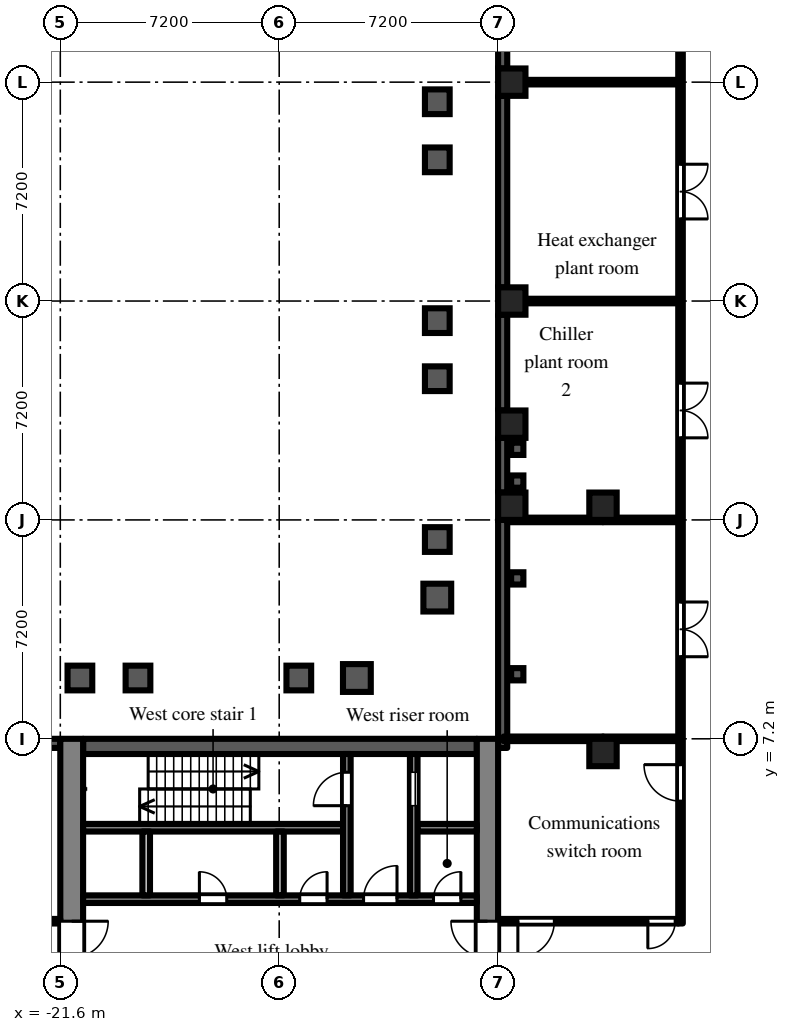
"""IFC4 building model, lengths in metres.
Left out: names, types, materials, properties, quantities, classifications, styles, units other than length and angle.
Written with IfcOpenShell. Run it as: python <this file> out.ifc"""

import sys

from ifc_helpers import new_model, si_unit, direction, frame, frame_2d, origin, origin_2d, place, context, subcontext, project, spatial, polyline, rectangle, outline, extrude, element, fill, save


model = new_model("IFC4")
c1 = context("Model", 3, precision=1e-05, world=origin(), true_north=direction((0.0, 1.0)))
c2 = subcontext(c1, "Body", "Model", "MODEL_VIEW")
j1 = project(units=[si_unit("LENGTHUNIT", "METRE"), si_unit("PLANEANGLEUNIT", "RADIAN")], contexts=[c1])
p1 = place(None, origin())
s1 = spatial("IfcSite", under=j1, at=p1, CompositionType="ELEMENT")
p2 = place(p1, origin())
s2 = spatial("IfcBuilding", under=s1, at=p2, CompositionType="ELEMENT")
p3 = place(p2, frame((0.0, 0.0, 62.7)))
s3 = spatial("IfcBuildingStorey", under=s2, at=p3, CompositionType="ELEMENT", Elevation=62.7)
for number, where, z_axis, x_axis in (
    (1, (-6.75, 14.85, 0.0), (0.0, 0.0, 1.0), (1.0, 0.0, 0.0)),
    (2, (-6.75, 17.55, 0.0), (0.0, 0.0, 1.0), (1.0, 0.0, 0.0)),
    (3, (-6.75, 21.6, 0.0), (0.0, 0.0, 1.0), (1.0, 0.0, 0.0)),
    (4, (-6.75, 28.8, 0.0), (0.0, 0.0, 1.0), (1.0, 0.0, 0.0)),
    (5, (-3.75, 6.75, 0.0), (0.0, 0.0, 1.0), (1.0, 0.0, 0.0)),
    (6, (-3.75, 14.85, 0.0), (0.0, 0.0, 1.0), (1.0, 0.0, 0.0)),
):
    element("IfcColumn", number, at=place(p3, frame(where, z_axis=z_axis, x_axis=x_axis)), inside=s3, PredefinedType="COLUMN", context=c2, shape_type="SweptSolid", body=[
        extrude(rectangle(XDim=0.9, YDim=0.9, at=origin_2d()), origin(), (0.0, 0.0, 1.0), 4.2),
    ])
p4 = place(p3, frame((-7.05, 35.55, 0.0), z_axis=(0.0, 0.0, 1.0), x_axis=(0.0, -1.0, 0.0)))
e7 = element("IfcWall", 7, at=p4, inside=s3, PredefinedType="SOLIDWALL", context=c2, shape_type="SweptSolid", body=[
    extrude(rectangle(XDim=6.3, YDim=0.3, at=frame_2d((3.15, 0.0))), origin(), (0.0, 0.0, 1.0), 3.775),
])
p5 = place(p3, frame((-7.05, 28.35, 0.0), z_axis=(0.0, 0.0, 1.0), x_axis=(0.0, -1.0, 0.0)))
e8 = element("IfcWall", 8, at=p5, inside=s3, PredefinedType="SOLIDWALL", context=c2, shape_type="SweptSolid", body=[
    extrude(outline(polyline([(0.0, 0.0), (6.3, 0.0), (6.3, 3.775), (5.152, 3.775), (5.15, 3.4), (4.35, 3.4), (4.348, 3.775), (0.0, 3.775), (0.0, 0.0)])), frame((0.0, 0.15, 0.0), z_axis=(0.0, -1.0, 0.0), x_axis=(1.0, 0.0, 0.0)), (0.0, 0.0, 1.0), 0.3),
])
p6 = place(p3, frame((-7.05, 21.15, 0.0), z_axis=(0.0, 0.0, 1.0), x_axis=(0.0, -1.0, 0.0)))
e9 = element("IfcWall", 9, at=p6, inside=s3, PredefinedType="SOLIDWALL", context=c2, shape_type="SweptSolid", body=[
    extrude(rectangle(XDim=3.15, YDim=0.3, at=frame_2d((1.575, 0.0))), origin(), (0.0, 0.0, 1.0), 3.775),
])
p7 = place(p3, frame((-7.05, 17.1, 0.0), z_axis=(0.0, 0.0, 1.0), x_axis=(0.0, -1.0, 0.0)))
e10 = element("IfcWall", 10, at=p7, inside=s3, PredefinedType="SOLIDWALL", context=c2, shape_type="SweptSolid", body=[
    extrude(rectangle(XDim=1.8, YDim=0.3, at=frame_2d((0.9, 0.0))), origin(), (0.0, 0.0, 1.0), 3.3),
])
p8 = place(p3, frame((-7.05, 14.4, 0.0), z_axis=(0.0, 0.0, 1.0), x_axis=(0.0, -1.0, 0.0)))
e11 = element("IfcWall", 11, at=p8, inside=s3, PredefinedType="SOLIDWALL", context=c2, shape_type="SweptSolid", body=[
    extrude(rectangle(XDim=7.5, YDim=0.3, at=frame_2d((3.75, 0.0))), origin(), (0.0, 0.0, 1.0), 3.775),
])
p9 = place(p3, frame((-21.6, 7.05, 0.0), z_axis=(0.0, 0.0, 1.0), x_axis=(-1.0, 0.0, 0.0)))
e12 = element("IfcWall", 12, at=p9, inside=s3, PredefinedType="SOLIDWALL", context=c2, shape_type="SweptSolid", body=[
    extrude(rectangle(XDim=2.7, YDim=0.3, at=frame_2d((1.35, 0.0))), origin(), (0.0, 0.0, 1.0), 3.3),
])
p10 = place(p3, frame((-7.55, -7.2, 0.0), z_axis=(0.0, 0.0, 1.0), x_axis=(0.0, 1.0, 0.0)))
e13 = element("IfcWall", 13, at=p10, inside=s3, PredefinedType="SHEAR", context=c2, shape_type="SweptSolid", body=[
    extrude(rectangle(XDim=14.4, YDim=0.7, at=frame_2d((7.2, 0.0))), origin(), (0.0, 0.0, 1.0), 3.775),
])
p11 = place(p10, frame((6.0, 0.0, 0.0)))
e14 = element("IfcOpeningElement", 14, at=p11, cuts=e13, PredefinedType="OPENING", context=c2, shape_type="SweptSolid", body=[
    extrude(rectangle(XDim=2.4, YDim=2.2, at=frame_2d((1.2, 1.1))), frame((0.0, 0.36, 0.0), z_axis=(0.0, -1.0, 0.0), x_axis=(1.0, 0.0, 0.0)), (0.0, 0.0, 1.0), 0.72),
])
p12 = place(p3, frame((-21.225, -7.2, 0.0), z_axis=(0.0, 0.0, 1.0), x_axis=(0.0, 1.0, 0.0)))
e15 = element("IfcWall", 15, at=p12, inside=s3, PredefinedType="SHEAR", context=c2, shape_type="SweptSolid", body=[
    extrude(rectangle(XDim=14.4, YDim=0.75, at=frame_2d((7.2, 0.0))), origin(), (0.0, 0.0, 1.0), 3.775),
])
p13 = place(p12, frame((6.0, 0.0, 0.0)))
e16 = element("IfcOpeningElement", 16, at=p13, cuts=e15, PredefinedType="OPENING", context=c2, shape_type="SweptSolid", body=[
    extrude(rectangle(XDim=2.4, YDim=2.2, at=frame_2d((1.2, 1.1))), frame((0.0, 0.385, 0.0), z_axis=(0.0, -1.0, 0.0), x_axis=(1.0, 0.0, 0.0)), (0.0, 0.0, 1.0), 0.77),
])
p14 = place(p3, frame((-7.9, 6.95, 0.0), z_axis=(0.0, 0.0, 1.0), x_axis=(-1.0, 0.0, 0.0)))
e17 = element("IfcWall", 17, at=p14, inside=s3, PredefinedType="SHEAR", context=c2, shape_type="SweptSolid", body=[
    extrude(rectangle(XDim=12.95, YDim=0.5, at=frame_2d((6.475, 0.0))), origin(), (0.0, 0.0, 1.0), 3.775),
])
p15 = place(p3, frame((-7.9, 1.925, 0.0), z_axis=(0.0, 0.0, 1.0), x_axis=(-1.0, 0.0, 0.0)))
e18 = element("IfcWall", 18, at=p15, inside=s3, PredefinedType="SHEAR", context=c2, shape_type="SweptSolid", body=[
    extrude(rectangle(XDim=12.95, YDim=0.25, at=frame_2d((6.475, 0.0))), origin(), (0.0, 0.0, 1.0), 3.775),
])
p16 = place(p15, frame((0.525, 0.0, 0.0)))
e19 = element("IfcOpeningElement", 19, at=p16, cuts=e18, PredefinedType="OPENING", context=c2, shape_type="SweptSolid", body=[
    extrude(rectangle(XDim=0.9, YDim=2.1, at=frame_2d((0.45, 1.05))), frame((0.0, 0.135, 0.0), z_axis=(0.0, -1.0, 0.0), x_axis=(1.0, 0.0, 0.0)), (0.0, 0.0, 1.0), 0.27),
])
p17 = place(p15, frame((2.625, 0.0, 0.0)))
e20 = element("IfcOpeningElement", 20, at=p17, cuts=e18, PredefinedType="OPENING", context=c2, shape_type="SweptSolid", body=[
    extrude(rectangle(XDim=1.1, YDim=2.1, at=frame_2d((0.55, 1.05))), frame((0.0, 0.135, 0.0), z_axis=(0.0, -1.0, 0.0), x_axis=(1.0, 0.0, 0.0)), (0.0, 0.0, 1.0), 0.27),
])
p18 = place(p15, frame((4.925, 0.0, 0.0)))
e21 = element("IfcOpeningElement", 21, at=p18, cuts=e18, PredefinedType="OPENING", context=c2, shape_type="SweptSolid", body=[
    extrude(rectangle(XDim=0.9, YDim=2.1, at=frame_2d((0.45, 1.05))), frame((0.0, 0.135, 0.0), z_axis=(0.0, -1.0, 0.0), x_axis=(1.0, 0.0, 0.0)), (0.0, 0.0, 1.0), 0.27),
])
p19 = place(p15, frame((8.225, 0.0, 0.0)))
e22 = element("IfcOpeningElement", 22, at=p19, cuts=e18, PredefinedType="OPENING", context=c2, shape_type="SweptSolid", body=[
    extrude(rectangle(XDim=0.9, YDim=2.1, at=frame_2d((0.45, 1.05))), frame((0.0, 0.135, 0.0), z_axis=(0.0, -1.0, 0.0), x_axis=(1.0, 0.0, 0.0)), (0.0, 0.0, 1.0), 0.27),
])
p20 = place(p3, frame((-7.9, 4.275, 0.0), z_axis=(0.0, 0.0, 1.0), x_axis=(-1.0, 0.0, 0.0)))
e23 = element("IfcWall", 23, at=p20, inside=s3, PredefinedType="SHEAR", context=c2, shape_type="SweptSolid", body=[
    extrude(rectangle(XDim=1.95, YDim=0.25, at=frame_2d((0.975, 0.0))), origin(), (0.0, 0.0, 1.0), 3.775),
])
p21 = place(p3, frame((-12.3, 4.275, 0.0), z_axis=(0.0, 0.0, 1.0), x_axis=(-1.0, 0.0, 0.0)))
e24 = element("IfcWall", 24, at=p21, inside=s3, PredefinedType="SHEAR", context=c2, shape_type="SweptSolid", body=[
    extrude(rectangle(XDim=8.55, YDim=0.25, at=frame_2d((4.275, 0.0))), origin(), (0.0, 0.0, 1.0), 3.775),
])
p22 = place(p3, frame((-9.975, 2.05, 0.0), z_axis=(0.0, 0.0, 1.0), x_axis=(0.0, 1.0, 0.0)))
e25 = element("IfcWall", 25, at=p22, inside=s3, PredefinedType="SHEAR", context=c2, shape_type="SweptSolid", body=[
    extrude(rectangle(XDim=4.65, YDim=0.25, at=frame_2d((2.325, 0.0))), origin(), (0.0, 0.0, 1.0), 3.775),
])
p23 = place(p22, frame((2.95, 0.0, 0.0)))
e26 = element("IfcOpeningElement", 26, at=p23, cuts=e25, PredefinedType="OPENING", context=c2, shape_type="SweptSolid", body=[
    extrude(rectangle(XDim=1.1, YDim=2.1, at=frame_2d((0.55, 1.05))), frame((0.0, 0.135, 0.0), z_axis=(0.0, -1.0, 0.0), x_axis=(1.0, 0.0, 0.0)), (0.0, 0.0, 1.0), 0.27),
])
p24 = place(p3, frame((-12.175, 2.05, 0.0), z_axis=(0.0, 0.0, 1.0), x_axis=(0.0, 1.0, 0.0)))
e27 = element("IfcWall", 27, at=p24, inside=s3, PredefinedType="SHEAR", context=c2, shape_type="SweptSolid", body=[
    extrude(rectangle(XDim=4.65, YDim=0.25, at=frame_2d((2.325, 0.0))), origin(), (0.0, 0.0, 1.0), 3.775),
])
p25 = place(p24, frame((2.95, 0.0, 0.0)))
e28 = element("IfcOpeningElement", 28, at=p25, cuts=e27, PredefinedType="OPENING", context=c2, shape_type="SweptSolid", body=[
    extrude(rectangle(XDim=1.1, YDim=2.1, at=frame_2d((0.55, 1.05))), frame((0.0, 0.135, 0.0), z_axis=(0.0, -1.0, 0.0), x_axis=(1.0, 0.0, 0.0)), (0.0, 0.0, 1.0), 0.27),
])
for number, where, z_axis, x_axis in (
    (29, (-14.375, 2.05, 0.0), (0.0, 0.0, 1.0), (0.0, 1.0, 0.0)),
    (30, (-18.775, 2.05, 0.0), (0.0, 0.0, 1.0), (0.0, 1.0, 0.0)),
):
    element("IfcWall", number, at=place(p3, frame(where, z_axis=z_axis, x_axis=x_axis)), inside=s3, PredefinedType="PARTITIONING", context=c2, shape_type="SweptSolid", body=[
        extrude(rectangle(XDim=2.1, YDim=0.25, at=frame_2d((1.05, 0.0))), origin(), (0.0, 0.0, 1.0), 3.775),
    ])
p26 = place(p3, frame((-36.5, 1.2, 0.0), z_axis=(0.0, 0.0, 1.0), x_axis=(1.0, 0.0, 0.0)))
e31 = element("IfcWall", 31, at=p26, inside=s3, PredefinedType="PARTITIONING", context=c2, shape_type="SweptSolid", body=[
    extrude(rectangle(XDim=14.9, YDim=0.15, at=frame_2d((7.45, 0.0))), origin(), (0.0, 0.0, 1.0), 3.775),
])
p27 = place(p26, frame((4.75, 0.0, 0.0)))
e32 = element("IfcOpeningElement", 32, at=p27, cuts=e31, PredefinedType="OPENING", context=c2, shape_type="SweptSolid", body=[
    extrude(rectangle(XDim=0.9, YDim=2.1, at=frame_2d((0.45, 1.05))), frame((0.0, 0.085, 0.0), z_axis=(0.0, -1.0, 0.0), x_axis=(1.0, 0.0, 0.0)), (0.0, 0.0, 1.0), 0.17),
])
p28 = place(p26, frame((12.5, 0.0, 0.0)))
e33 = element("IfcOpeningElement", 33, at=p28, cuts=e31, PredefinedType="OPENING", context=c2, shape_type="SweptSolid", body=[
    extrude(rectangle(XDim=1.2, YDim=2.1, at=frame_2d((0.6, 1.05))), frame((0.0, 0.085, 0.0), z_axis=(0.0, -1.0, 0.0), x_axis=(1.0, 0.0, 0.0)), (0.0, 0.0, 1.0), 0.17),
])
p29 = place(p26, frame((1.15, 0.0, 0.0)))
e34 = element("IfcOpeningElement", 34, at=p29, cuts=e31, PredefinedType="OPENING", context=c2, shape_type="SweptSolid", body=[
    extrude(rectangle(XDim=1.8, YDim=2.1, at=frame_2d((0.9, 1.05))), frame((0.0, 0.085, 0.0), z_axis=(0.0, -1.0, 0.0), x_axis=(1.0, 0.0, 0.0)), (0.0, 0.0, 1.0), 0.17),
])
p30 = place(p3, frame((-7.2, 1.2, 0.0), z_axis=(0.0, 0.0, 1.0), x_axis=(1.0, 0.0, 0.0)))
e35 = element("IfcWall", 35, at=p30, inside=s3, PredefinedType="PARTITIONING", context=c2, shape_type="SweptSolid", body=[
    extrude(rectangle(XDim=5.925, YDim=0.15, at=frame_2d((2.962, 0.0))), origin(), (0.0, 0.0, 1.0), 3.775),
])
p31 = place(p30, frame((0.65, 0.0, 0.0)))
e36 = element("IfcOpeningElement", 36, at=p31, cuts=e35, PredefinedType="OPENING", context=c2, shape_type="SweptSolid", body=[
    extrude(rectangle(XDim=1.2, YDim=2.1, at=frame_2d((0.6, 1.05))), frame((0.0, 0.085, 0.0), z_axis=(0.0, -1.0, 0.0), x_axis=(1.0, 0.0, 0.0)), (0.0, 0.0, 1.0), 0.17),
])
p32 = place(p30, frame((4.925, 0.0, 0.0)))
e37 = element("IfcOpeningElement", 37, at=p32, cuts=e35, PredefinedType="OPENING", context=c2, shape_type="SweptSolid", body=[
    extrude(rectangle(XDim=0.9, YDim=2.1, at=frame_2d((0.45, 1.05))), frame((0.0, 0.085, 0.0), z_axis=(0.0, -1.0, 0.0), x_axis=(1.0, 0.0, 0.0)), (0.0, 0.0, 1.0), 0.17),
])
p33 = place(p3, frame((-7.02, 7.2, 0.0), z_axis=(0.0, 0.0, 1.0), x_axis=(1.0, 0.0, 0.0)))
e38 = element("IfcWall", 38, at=p33, inside=s3, PredefinedType="PARTITIONING", context=c2, shape_type="SweptSolid", body=[
    extrude(rectangle(XDim=3.27, YDim=0.15, at=frame_2d((1.635, 0.0))), origin(), (0.0, 0.0, 1.0), 3.3),
])
p34 = place(p3, frame((-6.9, 14.4, 0.0), z_axis=(0.0, 0.0, 1.0), x_axis=(1.0, 0.0, 0.0)))
e39 = element("IfcWall", 39, at=p34, inside=s3, PredefinedType="PARTITIONING", context=c2, shape_type="SweptSolid", body=[
    extrude(rectangle(XDim=3.15, YDim=0.15, at=frame_2d((1.575, 0.0))), origin(), (0.0, 0.0, 1.0), 3.3),
])
p35 = place(p3, frame((-6.9, 21.6, 0.0), z_axis=(0.0, 0.0, 1.0), x_axis=(1.0, 0.0, 0.0)))
e40 = element("IfcWall", 40, at=p35, inside=s3, PredefinedType="PARTITIONING", context=c2, shape_type="SweptSolid", body=[
    extrude(rectangle(XDim=5.625, YDim=0.15, at=frame_2d((2.812, 0.0))), origin(), (0.0, 0.0, 1.0), 2.175),
])
p36 = place(p3, frame((-6.9, 28.8, 0.0), z_axis=(0.0, 0.0, 1.0), x_axis=(1.0, 0.0, 0.0)))
e41 = element("IfcWall", 41, at=p36, inside=s3, PredefinedType="PARTITIONING", context=c2, shape_type="SweptSolid", body=[
    extrude(rectangle(XDim=5.625, YDim=0.15, at=frame_2d((2.812, 0.0))), origin(), (0.0, 0.0, 1.0), 3.775),
])
p37 = place(p3, frame((-1.2, 1.125, 0.0), z_axis=(0.0, 0.0, 1.0), x_axis=(0.0, 1.0, 0.0)))
e42 = element("IfcWall", 42, at=p37, inside=s3, PredefinedType="PARTITIONING", context=c2, shape_type="SweptSolid", body=[
    extrude(outline(polyline([(0.0, 0.0), (35.375, 0.0), (35.375, 3.775), (22.877, 3.775), (22.875, 3.4), (22.075, 3.4), (22.073, 3.775), (0.0, 3.775), (0.0, 0.0)])), frame((0.0, 0.075, 0.0), z_axis=(0.0, -1.0, 0.0), x_axis=(1.0, 0.0, 0.0)), (0.0, 0.0, 1.0), 0.15),
])
p38 = place(p37, frame((4.025, 0.0, 0.0)))
e43 = element("IfcOpeningElement", 43, at=p38, cuts=e42, PredefinedType="OPENING", context=c2, shape_type="SweptSolid", body=[
    extrude(rectangle(XDim=1.2, YDim=2.1, at=frame_2d((0.6, 1.05))), frame((0.0, 0.085, 0.0), z_axis=(0.0, -1.0, 0.0), x_axis=(1.0, 0.0, 0.0)), (0.0, 0.0, 1.0), 0.17),
])
p39 = place(p37, frame((8.775, 0.0, 0.0)))
e44 = element("IfcOpeningElement", 44, at=p39, cuts=e42, PredefinedType="OPENING", context=c2, shape_type="SweptSolid", body=[
    extrude(rectangle(XDim=1.8, YDim=2.1, at=frame_2d((0.9, 1.05))), frame((0.0, 0.085, 0.0), z_axis=(0.0, -1.0, 0.0), x_axis=(1.0, 0.0, 0.0)), (0.0, 0.0, 1.0), 0.17),
])
p40 = place(p37, frame((15.975, 0.0, 0.0)))
e45 = element("IfcOpeningElement", 45, at=p40, cuts=e42, PredefinedType="OPENING", context=c2, shape_type="SweptSolid", body=[
    extrude(rectangle(XDim=1.8, YDim=2.1, at=frame_2d((0.9, 1.05))), frame((0.0, 0.085, 0.0), z_axis=(0.0, -1.0, 0.0), x_axis=(1.0, 0.0, 0.0)), (0.0, 0.0, 1.0), 0.17),
])
p41 = place(p37, frame((23.175, 0.0, 0.0)))
e46 = element("IfcOpeningElement", 46, at=p41, cuts=e42, PredefinedType="OPENING", context=c2, shape_type="SweptSolid", body=[
    extrude(rectangle(XDim=1.8, YDim=2.1, at=frame_2d((0.9, 1.05))), frame((0.0, 0.085, 0.0), z_axis=(0.0, -1.0, 0.0), x_axis=(1.0, 0.0, 0.0)), (0.0, 0.0, 1.0), 0.17),
])
p42 = place(p37, frame((30.625, 0.0, 0.0)))
e47 = element("IfcOpeningElement", 47, at=p42, cuts=e42, PredefinedType="OPENING", context=c2, shape_type="SweptSolid", body=[
    extrude(rectangle(XDim=1.8, YDim=2.1, at=frame_2d((0.9, 1.05))), frame((0.0, 0.085, 0.0), z_axis=(0.0, -1.0, 0.0), x_axis=(1.0, 0.0, 0.0)), (0.0, 0.0, 1.0), 0.17),
])
for number, where, z_axis, x_axis in (
    (48, (-3.75, 7.2, 0.0), (0.0, 0.0, 1.0), (1.0, 0.0, 0.0)),
    (49, (-3.75, 14.4, 0.0), (0.0, 0.0, 1.0), (1.0, 0.0, 0.0)),
):
    element("IfcWall", number, at=place(p3, frame(where, z_axis=z_axis, x_axis=x_axis)), inside=s3, PredefinedType="PARTITIONING", context=c2, shape_type="SweptSolid", body=[
        extrude(rectangle(XDim=2.475, YDim=0.15, at=frame_2d((1.238, 0.0))), origin(), (0.0, 0.0, 1.0), 3.775),
    ])
p43 = place(p23, origin())
e50 = element("IfcDoor", 50, at=p43, inside=s3, OperationType="SLIDING_TO_LEFT", PredefinedType="DOOR", context=c2, shape_type="SweptSolid", body=[
    extrude(rectangle(XDim=1.1, YDim=2.1, at=frame_2d((0.55, 1.05))), frame((0.0, 0.025, 0.0), z_axis=(0.0, -1.0, 0.0), x_axis=(1.0, 0.0, 0.0)), (0.0, 0.0, 1.0), 0.05),
])
fill(e26, e50)
p44 = place(p25, origin())
e51 = element("IfcDoor", 51, at=p44, inside=s3, OperationType="SINGLE_SWING_LEFT", PredefinedType="DOOR", context=c2, shape_type="SweptSolid", body=[
    extrude(rectangle(XDim=1.1, YDim=2.1, at=frame_2d((0.55, 1.05))), frame((0.0, 0.025, 0.0), z_axis=(0.0, -1.0, 0.0), x_axis=(1.0, 0.0, 0.0)), (0.0, 0.0, 1.0), 0.05),
])
fill(e28, e51)
p45 = place(p16, frame((0.9, 0.0, 0.0), z_axis=(0.0, 0.0, 1.0), x_axis=(-1.0, 0.0, 0.0)))
e52 = element("IfcDoor", 52, at=p45, inside=s3, OperationType="SINGLE_SWING_RIGHT", PredefinedType="DOOR", context=c2, shape_type="SweptSolid", body=[
    extrude(rectangle(XDim=0.9, YDim=2.1, at=frame_2d((0.45, 1.05))), frame((0.0, 0.025, 0.0), z_axis=(0.0, -1.0, 0.0), x_axis=(1.0, 0.0, 0.0)), (0.0, 0.0, 1.0), 0.05),
])
fill(e19, e52)
p46 = place(p17, frame((1.1, 0.0, 0.0), z_axis=(0.0, 0.0, 1.0), x_axis=(-1.0, 0.0, 0.0)))
e53 = element("IfcDoor", 53, at=p46, inside=s3, OperationType="SINGLE_SWING_RIGHT", PredefinedType="DOOR", context=c2, shape_type="SweptSolid", body=[
    extrude(rectangle(XDim=1.1, YDim=2.1, at=frame_2d((0.55, 1.05))), frame((0.0, 0.025, 0.0), z_axis=(0.0, -1.0, 0.0), x_axis=(1.0, 0.0, 0.0)), (0.0, 0.0, 1.0), 0.05),
])
fill(e20, e53)
p47 = place(p11, origin())
e54 = element("IfcDoor", 54, at=p47, inside=s3, OperationType="DOUBLE_DOOR_DOUBLE_SWING", PredefinedType="DOOR", context=c2, shape_type="SweptSolid", body=[
    extrude(rectangle(XDim=2.4, YDim=2.2, at=frame_2d((1.2, 1.1))), frame((0.0, 0.025, 0.0), z_axis=(0.0, -1.0, 0.0), x_axis=(1.0, 0.0, 0.0)), (0.0, 0.0, 1.0), 0.05),
])
fill(e14, e54)
p48 = place(p13, frame((2.4, 0.0, 0.0), z_axis=(0.0, 0.0, 1.0), x_axis=(-1.0, 0.0, 0.0)))
e55 = element("IfcDoor", 55, at=p48, inside=s3, OperationType="DOUBLE_DOOR_DOUBLE_SWING", PredefinedType="DOOR", context=c2, shape_type="SweptSolid", body=[
    extrude(rectangle(XDim=2.4, YDim=2.2, at=frame_2d((1.2, 1.1))), frame((0.0, 0.025, 0.0), z_axis=(0.0, -1.0, 0.0), x_axis=(1.0, 0.0, 0.0)), (0.0, 0.0, 1.0), 0.05),
])
fill(e16, e55)
p49 = place(p18, frame((0.9, 0.0, 0.0), z_axis=(0.0, 0.0, 1.0), x_axis=(-1.0, 0.0, 0.0)))
e56 = element("IfcDoor", 56, at=p49, inside=s3, OperationType="SINGLE_SWING_RIGHT", PredefinedType="DOOR", context=c2, shape_type="SweptSolid", body=[
    extrude(rectangle(XDim=0.9, YDim=2.1, at=frame_2d((0.45, 1.05))), frame((0.0, 0.025, 0.0), z_axis=(0.0, -1.0, 0.0), x_axis=(1.0, 0.0, 0.0)), (0.0, 0.0, 1.0), 0.05),
])
fill(e21, e56)
p50 = place(p19, frame((0.9, 0.0, 0.0), z_axis=(0.0, 0.0, 1.0), x_axis=(-1.0, 0.0, 0.0)))
e57 = element("IfcDoor", 57, at=p50, inside=s3, OperationType="SINGLE_SWING_LEFT", PredefinedType="DOOR", context=c2, shape_type="SweptSolid", body=[
    extrude(rectangle(XDim=0.9, YDim=2.1, at=frame_2d((0.45, 1.05))), frame((0.0, 0.025, 0.0), z_axis=(0.0, -1.0, 0.0), x_axis=(1.0, 0.0, 0.0)), (0.0, 0.0, 1.0), 0.05),
])
fill(e22, e57)
p51 = place(p31, frame((1.2, 0.0, 0.0), z_axis=(0.0, 0.0, 1.0), x_axis=(-1.0, 0.0, 0.0)))
e58 = element("IfcDoor", 58, at=p51, inside=s3, OperationType="SINGLE_SWING_RIGHT", PredefinedType="DOOR", context=c2, shape_type="SweptSolid", body=[
    extrude(rectangle(XDim=1.2, YDim=2.1, at=frame_2d((0.6, 1.05))), frame((0.0, 0.025, 0.0), z_axis=(0.0, -1.0, 0.0), x_axis=(1.0, 0.0, 0.0)), (0.0, 0.0, 1.0), 0.05),
])
fill(e36, e58)
p52 = place(p32, frame((0.9, 0.0, 0.0), z_axis=(0.0, 0.0, 1.0), x_axis=(-1.0, 0.0, 0.0)))
e59 = element("IfcDoor", 59, at=p52, inside=s3, OperationType="SINGLE_SWING_RIGHT", PredefinedType="DOOR", context=c2, shape_type="SweptSolid", body=[
    extrude(rectangle(XDim=0.9, YDim=2.1, at=frame_2d((0.45, 1.05))), frame((0.0, 0.025, 0.0), z_axis=(0.0, -1.0, 0.0), x_axis=(1.0, 0.0, 0.0)), (0.0, 0.0, 1.0), 0.05),
])
fill(e37, e59)
p53 = place(p38, origin())
e60 = element("IfcDoor", 60, at=p53, inside=s3, OperationType="SINGLE_SWING_RIGHT", PredefinedType="DOOR", context=c2, shape_type="SweptSolid", body=[
    extrude(rectangle(XDim=1.2, YDim=2.1, at=frame_2d((0.6, 1.05))), frame((0.0, 0.025, 0.0), z_axis=(0.0, -1.0, 0.0), x_axis=(1.0, 0.0, 0.0)), (0.0, 0.0, 1.0), 0.05),
])
fill(e43, e60)
p54 = place(p39, frame((1.8, 0.0, 0.0), z_axis=(0.0, 0.0, 1.0), x_axis=(-1.0, 0.0, 0.0)))
e61 = element("IfcDoor", 61, at=p54, inside=s3, OperationType="DOUBLE_DOOR_DOUBLE_SWING", PredefinedType="DOOR", context=c2, shape_type="SweptSolid", body=[
    extrude(rectangle(XDim=1.8, YDim=2.1, at=frame_2d((0.9, 1.05))), frame((0.0, 0.025, 0.0), z_axis=(0.0, -1.0, 0.0), x_axis=(1.0, 0.0, 0.0)), (0.0, 0.0, 1.0), 0.05),
])
fill(e44, e61)
p55 = place(p40, frame((1.8, 0.0, 0.0), z_axis=(0.0, 0.0, 1.0), x_axis=(-1.0, 0.0, 0.0)))
e62 = element("IfcDoor", 62, at=p55, inside=s3, OperationType="DOUBLE_DOOR_DOUBLE_SWING", PredefinedType="DOOR", context=c2, shape_type="SweptSolid", body=[
    extrude(rectangle(XDim=1.8, YDim=2.1, at=frame_2d((0.9, 1.05))), frame((0.0, 0.025, 0.0), z_axis=(0.0, -1.0, 0.0), x_axis=(1.0, 0.0, 0.0)), (0.0, 0.0, 1.0), 0.05),
])
fill(e45, e62)
p56 = place(p41, frame((1.8, 0.0, 0.0), z_axis=(0.0, 0.0, 1.0), x_axis=(-1.0, 0.0, 0.0)))
e63 = element("IfcDoor", 63, at=p56, inside=s3, OperationType="DOUBLE_DOOR_DOUBLE_SWING", PredefinedType="DOOR", context=c2, shape_type="SweptSolid", body=[
    extrude(rectangle(XDim=1.8, YDim=2.1, at=frame_2d((0.9, 1.05))), frame((0.0, 0.025, 0.0), z_axis=(0.0, -1.0, 0.0), x_axis=(1.0, 0.0, 0.0)), (0.0, 0.0, 1.0), 0.05),
])
fill(e46, e63)
save(model, sys.argv[1])
